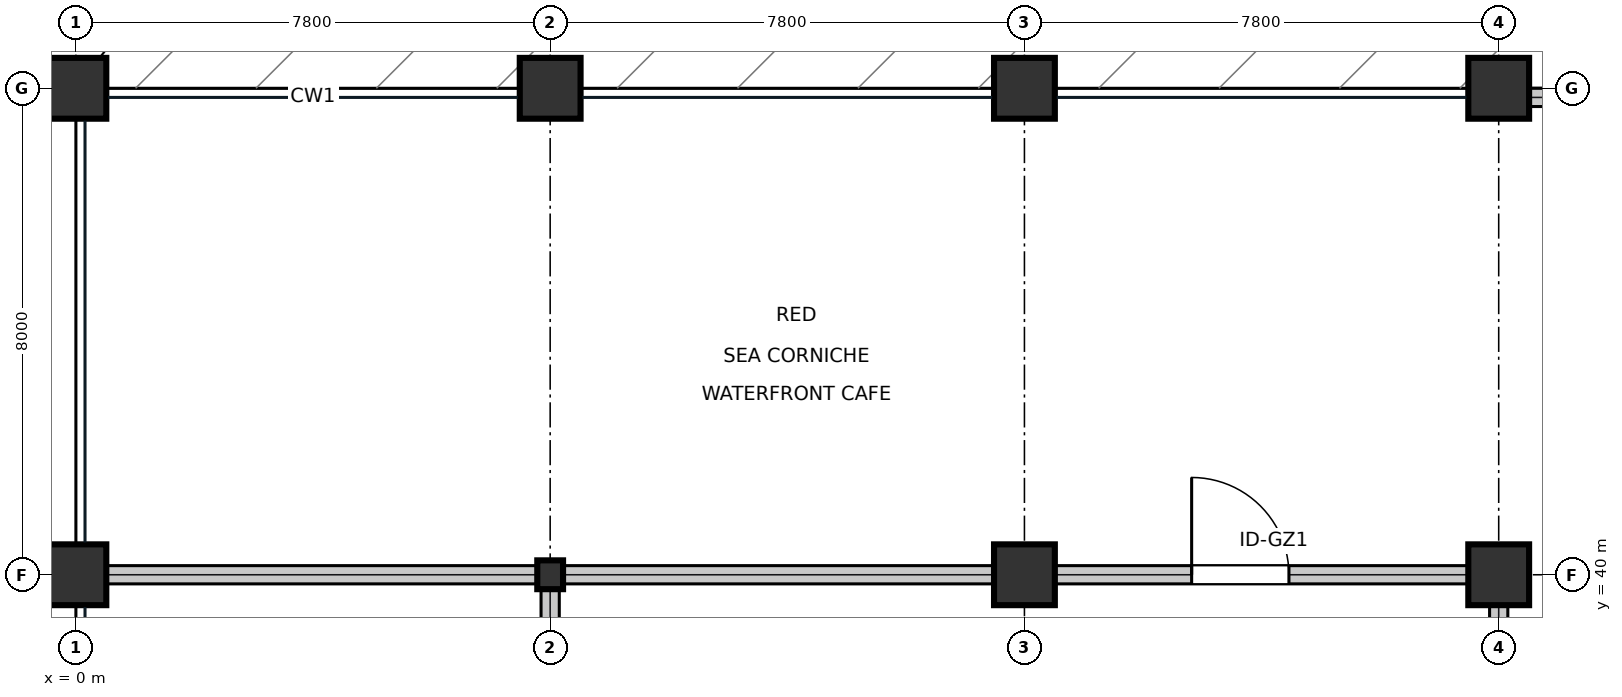
"""IFC4 building model, lengths in metres.
Left out: names, types, materials, properties, quantities, classifications, styles, units other than length and angle.
Written with IfcOpenShell. Run it as: python <this file> out.ifc"""

import sys

from ifc_helpers import new_model, si_unit, direction, frame, frame_2d, origin, origin_2d, place, context, subcontext, project, spatial, rectangle, i_section, extrude, element, fill, save


model = new_model("IFC4")
c1 = context("Model", 3, precision=1e-05, world=origin(), true_north=direction((0.0, 1.0)))
c2 = subcontext(c1, "Body", "Model", "MODEL_VIEW")
j1 = project(units=[si_unit("LENGTHUNIT", "METRE"), si_unit("PLANEANGLEUNIT", "RADIAN")], contexts=[c1])
p1 = place(None, origin())
s1 = spatial("IfcSite", under=j1, at=p1, CompositionType="ELEMENT")
p2 = place(p1, origin())
s2 = spatial("IfcBuilding", under=s1, at=p2, CompositionType="ELEMENT")
p3 = place(p2, origin())
s3 = spatial("IfcBuildingStorey", under=s2, at=p3, CompositionType="ELEMENT", Elevation=0.0)
for number, where, z_axis, x_axis in (
    (1, (0.0, 40.0, 0.0), (0.0, 0.0, 1.0), (1.0, 0.0, 0.0)),
    (2, (0.0, 48.0, 0.0), (0.0, 0.0, 1.0), (1.0, 0.0, 0.0)),
):
    element("IfcColumn", number, at=place(p3, frame(where, z_axis=z_axis, x_axis=x_axis)), inside=s3, PredefinedType="COLUMN", context=c2, shape_type="SweptSolid", body=[
        extrude(rectangle(XDim=1.0, YDim=1.0, at=origin_2d()), origin(), (0.0, 0.0, 1.0), 5.395),
    ])
p4 = place(p3, frame((7.8, 40.0, 0.0), z_axis=(0.0, 0.0, 1.0), x_axis=(1.0, 0.0, 0.0)))
e3 = element("IfcColumn", 3, at=p4, inside=s3, PredefinedType="COLUMN", context=c2, shape_type="SweptSolid", body=[
    extrude(i_section(OverallWidth=0.424, OverallDepth=0.474, WebThickness=0.048, FlangeThickness=0.077, at=origin_2d()), origin(), (0.0, 0.0, 1.0), 5.395),
])
for number, where, z_axis, x_axis in (
    (4, (7.8, 48.0, 0.0), (0.0, 0.0, 1.0), (1.0, 0.0, 0.0)),
    (5, (15.6, 40.0, 0.0), (0.0, 0.0, 1.0), (1.0, 0.0, 0.0)),
    (6, (15.6, 48.0, 0.0), (0.0, 0.0, 1.0), (1.0, 0.0, 0.0)),
    (7, (23.4, 40.0, 0.0), (0.0, 0.0, 1.0), (1.0, 0.0, 0.0)),
    (8, (23.4, 48.0, 0.0), (0.0, 0.0, 1.0), (1.0, 0.0, 0.0)),
):
    element("IfcColumn", number, at=place(p3, frame(where, z_axis=z_axis, x_axis=x_axis)), inside=s3, PredefinedType="COLUMN", context=c2, shape_type="SweptSolid", body=[
        extrude(rectangle(XDim=1.0, YDim=1.0, at=origin_2d()), origin(), (0.0, 0.0, 1.0), 5.395),
    ])
p5 = place(p3, frame((23.91, 47.85, 0.0), z_axis=(0.0, 0.0, 1.0), x_axis=(1.0, 0.0, 0.0)))
e9 = element("IfcWall", 9, at=p5, inside=s3, PredefinedType="STANDARD", context=c2, shape_type="SweptSolid", body=[
    extrude(rectangle(XDim=6.78, YDim=0.3, at=frame_2d((3.39, 0.0))), origin(), (0.0, 0.0, 1.0), 4.338),
])
p6 = place(p5, frame((2.39, 0.0, 0.0)))
e10 = element("IfcOpeningElement", 10, at=p6, cuts=e9, PredefinedType="OPENING", context=c2, shape_type="SweptSolid", body=[
    extrude(rectangle(XDim=2.0, YDim=2.4, at=frame_2d((1.0, 1.2))), frame((0.0, 0.16, 0.0), z_axis=(0.0, -1.0, 0.0), x_axis=(1.0, 0.0, 0.0)), (0.0, 0.0, 1.0), 0.32),
])
p7 = place(p3, frame((23.4, 24.0, 0.0), z_axis=(0.0, 0.0, 1.0), x_axis=(0.0, 1.0, 0.0)))
e11 = element("IfcWall", 11, at=p7, inside=s3, PredefinedType="PARTITIONING", context=c2, shape_type="SweptSolid", body=[
    extrude(rectangle(XDim=16.0, YDim=0.3, at=frame_2d((8.0, 0.0))), origin(), (0.0, 0.0, 1.0), 3.688),
])
p8 = place(p7, frame((4.2, 0.0, 0.0)))
e12 = element("IfcOpeningElement", 12, at=p8, cuts=e11, PredefinedType="OPENING", context=c2, shape_type="SweptSolid", body=[
    extrude(rectangle(XDim=1.8, YDim=2.4, at=frame_2d((0.9, 1.2))), frame((0.0, 0.16, 0.0), z_axis=(0.0, -1.0, 0.0), x_axis=(1.0, 0.0, 0.0)), (0.0, 0.0, 1.0), 0.32),
])
p9 = place(p3, frame((7.8, 8.0, 0.0), z_axis=(0.0, 0.0, 1.0), x_axis=(0.0, 1.0, 0.0)))
e13 = element("IfcWall", 13, at=p9, inside=s3, PredefinedType="PARTITIONING", context=c2, shape_type="SweptSolid", body=[
    extrude(rectangle(XDim=32.0, YDim=0.3, at=frame_2d((16.0, 0.0))), origin(), (0.0, 0.0, 1.0), 3.688),
])
p10 = place(p9, frame((28.5, 0.0, 0.0)))
e14 = element("IfcOpeningElement", 14, at=p10, cuts=e13, PredefinedType="OPENING", context=c2, shape_type="SweptSolid", body=[
    extrude(rectangle(XDim=1.05, YDim=2.15, at=frame_2d((0.525, 1.075))), frame((0.0, 0.16, 0.0), z_axis=(0.0, -1.0, 0.0), x_axis=(1.0, 0.0, 0.0)), (0.0, 0.0, 1.0), 0.32),
])
p11 = place(p3, frame((0.15, 40.0, 0.0), z_axis=(0.0, 0.0, 1.0), x_axis=(1.0, 0.0, 0.0)))
e15 = element("IfcWall", 15, at=p11, inside=s3, PredefinedType="PARTITIONING", context=c2, shape_type="SweptSolid", body=[
    extrude(rectangle(XDim=23.25, YDim=0.3, at=frame_2d((11.625, 0.0))), origin(), (0.0, 0.0, 1.0), 3.688),
])
p12 = place(p11, frame((18.2, 0.0, 0.0)))
e16 = element("IfcOpeningElement", 16, at=p12, cuts=e15, PredefinedType="OPENING", context=c2, shape_type="SweptSolid", body=[
    extrude(rectangle(XDim=1.6, YDim=2.2, at=frame_2d((0.8, 1.1))), frame((0.0, 0.16, 0.0), z_axis=(0.0, -1.0, 0.0), x_axis=(1.0, 0.0, 0.0)), (0.0, 0.0, 1.0), 0.32),
])
p13 = place(p12, origin())
e17 = element("IfcDoor", 17, at=p13, inside=s3, OperationType="SINGLE_SWING_LEFT", PredefinedType="DOOR", context=c2, shape_type="SweptSolid", body=[
    extrude(rectangle(XDim=1.6, YDim=2.2, at=frame_2d((0.8, 1.1))), frame((0.0, 0.025, 0.0), z_axis=(0.0, -1.0, 0.0), x_axis=(1.0, 0.0, 0.0)), (0.0, 0.0, 1.0), 0.05),
])
fill(e16, e17)
save(model, sys.argv[1])
